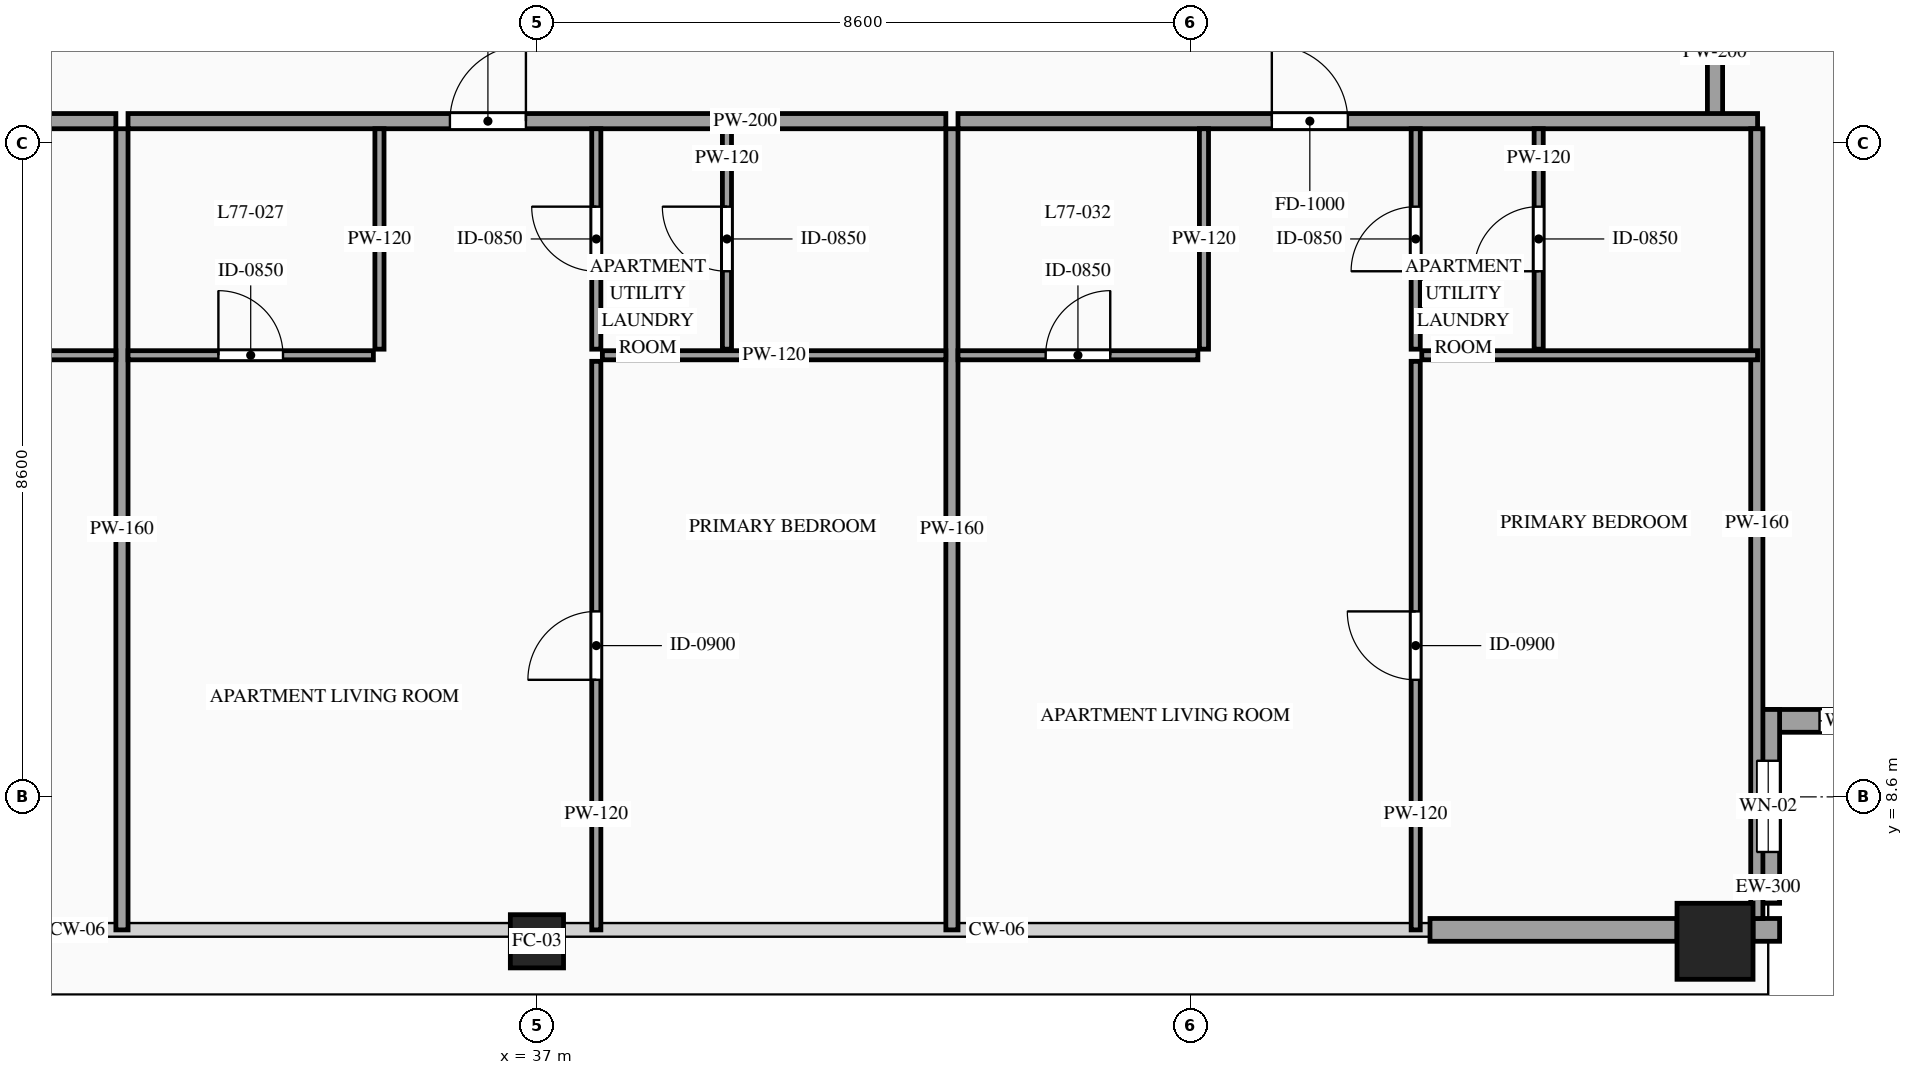
"""IFC4 building model, lengths in metres.
Left out: names, types, materials, properties, quantities, classifications, styles, units other than length and angle.
Written with IfcOpenShell. Run it as: python <this file> out.ifc"""

import sys

from ifc_helpers import new_model, si_unit, direction, frame, frame_2d, origin, origin_2d, place, context, subcontext, project, spatial, rectangle, hollow_rectangle, extrude, source, transform, mapped, element, fill, save


model = new_model("IFC4")
c1 = context("Model", 3, precision=1e-05, world=origin(), true_north=direction((0.0, 1.0)))
c2 = subcontext(c1, "Body", "Model", "MODEL_VIEW")
j1 = project(units=[si_unit("LENGTHUNIT", "METRE"), si_unit("PLANEANGLEUNIT", "RADIAN")], contexts=[c1])
p1 = place(None, origin())
s1 = spatial("IfcSite", under=j1, at=p1, CompositionType="ELEMENT")
p2 = place(p1, origin())
s2 = spatial("IfcBuilding", under=s1, at=p2, CompositionType="ELEMENT")
p3 = place(p2, frame((0.0, 0.0, 289.1)))
s3 = spatial("IfcBuildingStorey", under=s2, at=p3, CompositionType="ELEMENT", Elevation=289.1)
m1 = source(origin(), c2, "Body", "SweptSolid", [
    extrude(hollow_rectangle(XDim=0.7, YDim=0.7, WallThickness=0.032, at=origin_2d()), origin(), (0.0, 0.0, 1.0), 3.5),
])
p4 = place(p3, frame((37.0, 6.7, 0.0), z_axis=(0.0, 0.0, 1.0), x_axis=(1.0, 0.0, 0.0)))
e1 = element("IfcColumn", 1, at=p4, inside=s3, PredefinedType="COLUMN", context=c2, shape_type="MappedRepresentation", body=[
    mapped(m1, transform((0.0, 0.0, 0.0), scale=1.0)),
])
m2 = source(origin(), c2, "Body", "SweptSolid", [
    extrude(hollow_rectangle(XDim=1.0, YDim=1.0, WallThickness=0.048, at=origin_2d()), origin(), (0.0, 0.0, 1.0), 3.5),
])
p5 = place(p3, frame((52.5, 6.7, 0.0), z_axis=(0.0, 0.0, 1.0), x_axis=(1.0, 0.0, 0.0)))
e2 = element("IfcColumn", 2, at=p5, inside=s3, PredefinedType="COLUMN", context=c2, shape_type="MappedRepresentation", body=[
    mapped(m2, transform((0.0, 0.0, 0.0), scale=1.0)),
])
p6 = place(p3, frame((53.05, 9.6, 0.0), z_axis=(0.0, 0.0, 1.0), x_axis=(1.0, 0.0, 0.0)))
e3 = element("IfcWall", 3, at=p6, inside=s3, PredefinedType="SOLIDWALL", context=c2, shape_type="SweptSolid", body=[
    extrude(rectangle(XDim=2.55, YDim=0.3, at=frame_2d((1.275, 0.0))), origin(), (0.0, 0.0, 1.0), 3.28),
])
p7 = place(p6, frame((0.825, 0.0, 0.85)))
e4 = element("IfcOpeningElement", 4, at=p7, cuts=e3, PredefinedType="OPENING", context=c2, shape_type="SweptSolid", body=[
    extrude(rectangle(XDim=0.9, YDim=1.5, at=frame_2d((0.45, 0.75))), frame((0.0, 0.165, 0.0), z_axis=(0.0, -1.0, 0.0), x_axis=(1.0, 0.0, 0.0)), (0.0, 0.0, 1.0), 0.33),
])
p8 = place(p3, frame((53.2, 7.2, 0.0), z_axis=(0.0, 0.0, 1.0), x_axis=(0.0, 1.0, 0.0)))
e5 = element("IfcWall", 5, at=p8, inside=s3, PredefinedType="SOLIDWALL", context=c2, shape_type="SweptSolid", body=[
    extrude(rectangle(XDim=2.55, YDim=0.3, at=frame_2d((1.275, 0.0))), origin(), (0.0, 0.0, 1.0), 3.28),
])
p9 = place(p8, frame((0.675, 0.0, 0.85)))
e6 = element("IfcOpeningElement", 6, at=p9, cuts=e5, PredefinedType="OPENING", context=c2, shape_type="SweptSolid", body=[
    extrude(rectangle(XDim=1.2, YDim=2.1, at=frame_2d((0.6, 1.05))), frame((0.0, 0.165, 0.0), z_axis=(0.0, -1.0, 0.0), x_axis=(1.0, 0.0, 0.0)), (0.0, 0.0, 1.0), 0.33),
])
m3 = source(origin(), c2, "Body", "SweptSolid", [
    extrude(rectangle(XDim=0.35, YDim=0.3, at=frame_2d((0.175, 0.0))), origin(), (0.0, 0.0, 1.0), 3.28),
])
p10 = place(p3, frame((53.0, 6.85, 0.0), z_axis=(0.0, 0.0, 1.0), x_axis=(1.0, 0.0, 0.0)))
e7 = element("IfcWall", 7, at=p10, inside=s3, PredefinedType="SOLIDWALL", context=c2, shape_type="MappedRepresentation", body=[
    mapped(m3, transform((0.0, 0.0, 0.0), scale=1.0)),
])
m4 = source(origin(), c2, "Body", "SweptSolid", [
    extrude(rectangle(XDim=3.25, YDim=0.3, at=frame_2d((1.625, 0.0))), origin(), (0.0, 0.0, 1.0), 2.885),
])
p11 = place(p3, frame((48.75, 6.85, 0.0), z_axis=(0.0, 0.0, 1.0), x_axis=(1.0, 0.0, 0.0)))
e8 = element("IfcWall", 8, at=p11, inside=s3, PredefinedType="SOLIDWALL", context=c2, shape_type="MappedRepresentation", body=[
    mapped(m4, transform((0.0, 0.0, 0.0), scale=1.0)),
])
m5 = source(origin(), c2, "Body", "SweptSolid", [
    extrude(rectangle(XDim=1.7, YDim=0.2, at=frame_2d((0.85, 0.0))), origin(), (0.0, 0.0, 1.0), 3.28),
])
p12 = place(p3, frame((52.5, 17.55, 0.0), z_axis=(0.0, 0.0, 1.0), x_axis=(0.0, 1.0, 0.0)))
e9 = element("IfcWall", 9, at=p12, inside=s3, PredefinedType="PARTITIONING", context=c2, shape_type="MappedRepresentation", body=[
    mapped(m5, transform((0.0, 0.0, 0.0), scale=1.0)),
])
p13 = place(p3, frame((20.94, 17.49, 0.0), z_axis=(0.0, 0.0, 1.0), x_axis=(1.0, 0.0, 0.0)))
e10 = element("IfcWall", 10, at=p13, inside=s3, PredefinedType="PARTITIONING", context=c2, shape_type="SweptSolid", body=[
    extrude(rectangle(XDim=10.52, YDim=0.2, at=frame_2d((5.26, 0.0))), origin(), (0.0, 0.0, 1.0), 3.28),
])
p14 = place(p13, frame((4.129, 0.0, 0.0)))
e11 = element("IfcOpeningElement", 11, at=p14, cuts=e10, PredefinedType="OPENING", context=c2, shape_type="SweptSolid", body=[
    extrude(rectangle(XDim=1.0, YDim=2.2, at=frame_2d((0.5, 1.1))), frame((0.0, 0.115, 0.0), z_axis=(0.0, -1.0, 0.0), x_axis=(1.0, 0.0, 0.0)), (0.0, 0.0, 1.0), 0.23),
])
m6 = source(origin(), c2, "Body", "SweptSolid", [
    extrude(rectangle(XDim=10.54, YDim=0.16, at=frame_2d((5.27, 0.0))), origin(), (0.0, 0.0, 1.0), 3.28),
])
p15 = place(p3, frame((31.54, 6.85, 0.0), z_axis=(0.0, 0.0, 1.0), x_axis=(0.0, 1.0, 0.0)))
e12 = element("IfcWall", 12, at=p15, inside=s3, PredefinedType="PARTITIONING", context=c2, shape_type="MappedRepresentation", body=[
    mapped(m6, transform((0.0, 0.0, 0.0), scale=1.0)),
])
m7 = source(origin(), c2, "Body", "SweptSolid", [
    extrude(rectangle(XDim=4.418, YDim=0.12, at=frame_2d((2.209, 0.0))), origin(), (0.0, 0.0, 1.0), 3.28),
])
p16 = place(p3, frame((27.042, 14.41, 0.0), z_axis=(0.0, 0.0, 1.0), x_axis=(1.0, 0.0, 0.0)))
e13 = element("IfcWall", 13, at=p16, inside=s3, PredefinedType="PARTITIONING", context=c2, shape_type="MappedRepresentation", body=[
    mapped(m7, transform((0.0, 0.0, 0.0), scale=1.0)),
])
p17 = place(p3, frame((31.62, 17.49, 0.0), z_axis=(0.0, 0.0, 1.0), x_axis=(1.0, 0.0, 0.0)))
e14 = element("IfcWall", 14, at=p17, inside=s3, PredefinedType="PARTITIONING", context=c2, shape_type="SweptSolid", body=[
    extrude(rectangle(XDim=10.76, YDim=0.2, at=frame_2d((5.38, 0.0))), origin(), (0.0, 0.0, 1.0), 3.28),
])
p18 = place(p17, frame((4.235, 0.0, 0.0)))
e15 = element("IfcOpeningElement", 15, at=p18, cuts=e14, PredefinedType="OPENING", context=c2, shape_type="SweptSolid", body=[
    extrude(rectangle(XDim=1.0, YDim=2.2, at=frame_2d((0.5, 1.1))), frame((0.0, 0.115, 0.0), z_axis=(0.0, -1.0, 0.0), x_axis=(1.0, 0.0, 0.0)), (0.0, 0.0, 1.0), 0.23),
])
p19 = place(p3, frame((42.46, 6.85, 0.0), z_axis=(0.0, 0.0, 1.0), x_axis=(0.0, 1.0, 0.0)))
e16 = element("IfcWall", 16, at=p19, inside=s3, PredefinedType="PARTITIONING", context=c2, shape_type="MappedRepresentation", body=[
    mapped(m6, transform((0.0, 0.0, 0.0), scale=1.0)),
])
p20 = place(p3, frame((31.62, 14.41, 0.0), z_axis=(0.0, 0.0, 1.0), x_axis=(1.0, 0.0, 0.0)))
e17 = element("IfcWall", 17, at=p20, inside=s3, PredefinedType="PARTITIONING", context=c2, shape_type="SweptSolid", body=[
    extrude(rectangle(XDim=3.228, YDim=0.12, at=frame_2d((1.614, 0.0))), origin(), (0.0, 0.0, 1.0), 3.28),
])
p21 = place(p20, frame((1.189, 0.0, 0.0)))
e18 = element("IfcOpeningElement", 18, at=p21, cuts=e17, PredefinedType="OPENING", context=c2, shape_type="SweptSolid", body=[
    extrude(rectangle(XDim=0.85, YDim=2.1, at=frame_2d((0.425, 1.05))), frame((0.0, 0.075, 0.0), z_axis=(0.0, -1.0, 0.0), x_axis=(1.0, 0.0, 0.0)), (0.0, 0.0, 1.0), 0.15),
])
m8 = source(origin(), c2, "Body", "SweptSolid", [
    extrude(rectangle(XDim=2.9, YDim=0.12, at=frame_2d((1.45, 0.0))), origin(), (0.0, 0.0, 1.0), 3.28),
])
p22 = place(p3, frame((34.928, 14.49, 0.0), z_axis=(0.0, 0.0, 1.0), x_axis=(0.0, 1.0, 0.0)))
e19 = element("IfcWall", 19, at=p22, inside=s3, PredefinedType="PARTITIONING", context=c2, shape_type="MappedRepresentation", body=[
    mapped(m8, transform((0.0, 0.0, 0.0), scale=1.0)),
])
p23 = place(p3, frame((39.5, 14.49, 0.0), z_axis=(0.0, 0.0, 1.0), x_axis=(0.0, 1.0, 0.0)))
e20 = element("IfcWall", 20, at=p23, inside=s3, PredefinedType="PARTITIONING", context=c2, shape_type="SweptSolid", body=[
    extrude(rectangle(XDim=2.9, YDim=0.12, at=frame_2d((1.45, 0.0))), origin(), (0.0, 0.0, 1.0), 3.28),
])
p24 = place(p23, frame((1.025, 0.0, 0.0)))
e21 = element("IfcOpeningElement", 21, at=p24, cuts=e20, PredefinedType="OPENING", context=c2, shape_type="SweptSolid", body=[
    extrude(rectangle(XDim=0.85, YDim=2.1, at=frame_2d((0.425, 1.05))), frame((0.0, 0.075, 0.0), z_axis=(0.0, -1.0, 0.0), x_axis=(1.0, 0.0, 0.0)), (0.0, 0.0, 1.0), 0.15),
])
m9 = source(origin(), c2, "Body", "SweptSolid", [
    extrude(rectangle(XDim=4.519, YDim=0.12, at=frame_2d((2.259, 0.0))), origin(), (0.0, 0.0, 1.0), 3.28),
])
p25 = place(p3, frame((37.861, 14.41, 0.0), z_axis=(0.0, 0.0, 1.0), x_axis=(1.0, 0.0, 0.0)))
e22 = element("IfcWall", 22, at=p25, inside=s3, PredefinedType="PARTITIONING", context=c2, shape_type="MappedRepresentation", body=[
    mapped(m9, transform((0.0, 0.0, 0.0), scale=1.0)),
])
p26 = place(p3, frame((37.781, 6.85, 0.0), z_axis=(0.0, 0.0, 1.0), x_axis=(0.0, 1.0, 0.0)))
e23 = element("IfcWall", 23, at=p26, inside=s3, PredefinedType="PARTITIONING", context=c2, shape_type="SweptSolid", body=[
    extrude(rectangle(XDim=7.48, YDim=0.12, at=frame_2d((3.74, 0.0))), origin(), (0.0, 0.0, 1.0), 3.28),
])
p27 = place(p26, frame((3.29, 0.0, 0.0)))
e24 = element("IfcOpeningElement", 24, at=p27, cuts=e23, PredefinedType="OPENING", context=c2, shape_type="SweptSolid", body=[
    extrude(rectangle(XDim=0.9, YDim=2.15, at=frame_2d((0.45, 1.075))), frame((0.0, 0.075, 0.0), z_axis=(0.0, -1.0, 0.0), x_axis=(1.0, 0.0, 0.0)), (0.0, 0.0, 1.0), 0.15),
])
p28 = place(p3, frame((37.781, 14.49, 0.0), z_axis=(0.0, 0.0, 1.0), x_axis=(0.0, 1.0, 0.0)))
e25 = element("IfcWall", 25, at=p28, inside=s3, PredefinedType="PARTITIONING", context=c2, shape_type="SweptSolid", body=[
    extrude(rectangle(XDim=2.9, YDim=0.12, at=frame_2d((1.45, 0.0))), origin(), (0.0, 0.0, 1.0), 3.28),
])
p29 = place(p28, frame((1.025, 0.0, 0.0)))
e26 = element("IfcOpeningElement", 26, at=p29, cuts=e25, PredefinedType="OPENING", context=c2, shape_type="SweptSolid", body=[
    extrude(rectangle(XDim=0.85, YDim=2.1, at=frame_2d((0.425, 1.05))), frame((0.0, 0.075, 0.0), z_axis=(0.0, -1.0, 0.0), x_axis=(1.0, 0.0, 0.0)), (0.0, 0.0, 1.0), 0.15),
])
p30 = place(p3, frame((42.54, 17.49, 0.0), z_axis=(0.0, 0.0, 1.0), x_axis=(1.0, 0.0, 0.0)))
e27 = element("IfcWall", 27, at=p30, inside=s3, PredefinedType="PARTITIONING", context=c2, shape_type="SweptSolid", body=[
    extrude(rectangle(XDim=10.52, YDim=0.2, at=frame_2d((5.26, 0.0))), origin(), (0.0, 0.0, 1.0), 3.28),
])
p31 = place(p30, frame((4.129, 0.0, 0.0)))
e28 = element("IfcOpeningElement", 28, at=p31, cuts=e27, PredefinedType="OPENING", context=c2, shape_type="SweptSolid", body=[
    extrude(rectangle(XDim=1.0, YDim=2.2, at=frame_2d((0.5, 1.1))), frame((0.0, 0.115, 0.0), z_axis=(0.0, -1.0, 0.0), x_axis=(1.0, 0.0, 0.0)), (0.0, 0.0, 1.0), 0.23),
])
m10 = source(origin(), c2, "Body", "SweptSolid", [
    extrude(rectangle(XDim=10.39, YDim=0.16, at=frame_2d((5.195, 0.0))), origin(), (0.0, 0.0, 1.0), 3.28),
])
p32 = place(p3, frame((53.05, 7.0, 0.0), z_axis=(0.0, 0.0, 1.0), x_axis=(0.0, 1.0, 0.0)))
e29 = element("IfcWall", 29, at=p32, inside=s3, PredefinedType="PARTITIONING", context=c2, shape_type="MappedRepresentation", body=[
    mapped(m10, transform((0.0, 0.0, 0.0), scale=1.0)),
])
p33 = place(p3, frame((42.54, 14.41, 0.0), z_axis=(0.0, 0.0, 1.0), x_axis=(1.0, 0.0, 0.0)))
e30 = element("IfcWall", 30, at=p33, inside=s3, PredefinedType="PARTITIONING", context=c2, shape_type="SweptSolid", body=[
    extrude(rectangle(XDim=3.156, YDim=0.12, at=frame_2d((1.578, 0.0))), origin(), (0.0, 0.0, 1.0), 3.28),
])
p34 = place(p33, frame((1.153, 0.0, 0.0)))
e31 = element("IfcOpeningElement", 31, at=p34, cuts=e30, PredefinedType="OPENING", context=c2, shape_type="SweptSolid", body=[
    extrude(rectangle(XDim=0.85, YDim=2.1, at=frame_2d((0.425, 1.05))), frame((0.0, 0.075, 0.0), z_axis=(0.0, -1.0, 0.0), x_axis=(1.0, 0.0, 0.0)), (0.0, 0.0, 1.0), 0.15),
])
p35 = place(p3, frame((45.776, 14.49, 0.0), z_axis=(0.0, 0.0, 1.0), x_axis=(0.0, 1.0, 0.0)))
e32 = element("IfcWall", 32, at=p35, inside=s3, PredefinedType="PARTITIONING", context=c2, shape_type="MappedRepresentation", body=[
    mapped(m8, transform((0.0, 0.0, 0.0), scale=1.0)),
])
p36 = place(p3, frame((50.18, 14.49, 0.0), z_axis=(0.0, 0.0, 1.0), x_axis=(0.0, 1.0, 0.0)))
e33 = element("IfcWall", 33, at=p36, inside=s3, PredefinedType="PARTITIONING", context=c2, shape_type="SweptSolid", body=[
    extrude(rectangle(XDim=2.9, YDim=0.12, at=frame_2d((1.45, 0.0))), origin(), (0.0, 0.0, 1.0), 2.825),
])
p37 = place(p36, frame((1.025, 0.0, 0.0)))
e34 = element("IfcOpeningElement", 34, at=p37, cuts=e33, PredefinedType="OPENING", context=c2, shape_type="SweptSolid", body=[
    extrude(rectangle(XDim=0.85, YDim=2.1, at=frame_2d((0.425, 1.05))), frame((0.0, 0.075, 0.0), z_axis=(0.0, -1.0, 0.0), x_axis=(1.0, 0.0, 0.0)), (0.0, 0.0, 1.0), 0.15),
])
p38 = place(p3, frame((48.642, 14.41, 0.0), z_axis=(0.0, 0.0, 1.0), x_axis=(1.0, 0.0, 0.0)))
e35 = element("IfcWall", 35, at=p38, inside=s3, PredefinedType="PARTITIONING", context=c2, shape_type="MappedRepresentation", body=[
    mapped(m7, transform((0.0, 0.0, 0.0), scale=1.0)),
])
p39 = place(p3, frame((48.562, 6.85, 0.0), z_axis=(0.0, 0.0, 1.0), x_axis=(0.0, 1.0, 0.0)))
e36 = element("IfcWall", 36, at=p39, inside=s3, PredefinedType="PARTITIONING", context=c2, shape_type="SweptSolid", body=[
    extrude(rectangle(XDim=7.48, YDim=0.12, at=frame_2d((3.74, 0.0))), origin(), (0.0, 0.0, 1.0), 3.28),
])
p40 = place(p39, frame((3.29, 0.0, 0.0)))
e37 = element("IfcOpeningElement", 37, at=p40, cuts=e36, PredefinedType="OPENING", context=c2, shape_type="SweptSolid", body=[
    extrude(rectangle(XDim=0.9, YDim=2.15, at=frame_2d((0.45, 1.075))), frame((0.0, 0.075, 0.0), z_axis=(0.0, -1.0, 0.0), x_axis=(1.0, 0.0, 0.0)), (0.0, 0.0, 1.0), 0.15),
])
p41 = place(p3, frame((48.562, 14.49, 0.0), z_axis=(0.0, 0.0, 1.0), x_axis=(0.0, 1.0, 0.0)))
e38 = element("IfcWall", 38, at=p41, inside=s3, PredefinedType="PARTITIONING", context=c2, shape_type="SweptSolid", body=[
    extrude(rectangle(XDim=2.9, YDim=0.12, at=frame_2d((1.45, 0.0))), origin(), (0.0, 0.0, 1.0), 3.28),
])
p42 = place(p41, frame((1.025, 0.0, 0.0)))
e39 = element("IfcOpeningElement", 39, at=p42, cuts=e38, PredefinedType="OPENING", context=c2, shape_type="SweptSolid", body=[
    extrude(rectangle(XDim=0.85, YDim=2.1, at=frame_2d((0.425, 1.05))), frame((0.0, 0.075, 0.0), z_axis=(0.0, -1.0, 0.0), x_axis=(1.0, 0.0, 0.0)), (0.0, 0.0, 1.0), 0.15),
])
m11 = source(origin(), c2, "Body", "SweptSolid", [
    extrude(rectangle(XDim=0.9, YDim=1.5, at=frame_2d((0.45, 0.75))), frame((0.0, 0.03, 0.0), z_axis=(0.0, -1.0, 0.0), x_axis=(1.0, 0.0, 0.0)), (0.0, 0.0, 1.0), 0.06),
])
p43 = place(p7, origin())
e40 = element("IfcWindow", 40, at=p43, inside=s3, PartitioningType="SINGLE_PANEL", PredefinedType="WINDOW", context=c2, shape_type="MappedRepresentation", body=[
    mapped(m11, transform((0.0, 0.0, 0.0), scale=1.0)),
])
fill(e4, e40)
m12 = source(origin(), c2, "Body", "SweptSolid", [
    extrude(rectangle(XDim=1.2, YDim=2.1, at=frame_2d((0.6, 1.05))), frame((0.0, 0.03, 0.0), z_axis=(0.0, -1.0, 0.0), x_axis=(1.0, 0.0, 0.0)), (0.0, 0.0, 1.0), 0.06),
])
p44 = place(p9, origin())
e41 = element("IfcWindow", 41, at=p44, inside=s3, PartitioningType="SINGLE_PANEL", PredefinedType="WINDOW", context=c2, shape_type="MappedRepresentation", body=[
    mapped(m12, transform((0.0, 0.0, 0.0), scale=1.0)),
])
fill(e6, e41)
m13 = source(origin(), c2, "Body", "SweptSolid", [
    extrude(rectangle(XDim=1.0, YDim=2.2, at=frame_2d((0.5, 1.1))), frame((0.0, 0.025, 0.0), z_axis=(0.0, -1.0, 0.0), x_axis=(1.0, 0.0, 0.0)), (0.0, 0.0, 1.0), 0.05),
])
p45 = place(p18, origin())
e42 = element("IfcDoor", 42, at=p45, inside=s3, OperationType="SINGLE_SWING_RIGHT", PredefinedType="DOOR", context=c2, shape_type="MappedRepresentation", body=[
    mapped(m13, transform((0.0, 0.0, 0.0), scale=1.0)),
])
fill(e15, e42)
m14 = source(origin(), c2, "Body", "SweptSolid", [
    extrude(rectangle(XDim=0.85, YDim=2.1, at=frame_2d((0.425, 1.05))), frame((0.0, 0.025, 0.0), z_axis=(0.0, -1.0, 0.0), x_axis=(1.0, 0.0, 0.0)), (0.0, 0.0, 1.0), 0.05),
])
p46 = place(p21, origin())
e43 = element("IfcDoor", 43, at=p46, inside=s3, OperationType="SINGLE_SWING_LEFT", PredefinedType="DOOR", context=c2, shape_type="MappedRepresentation", body=[
    mapped(m14, transform((0.0, 0.0, 0.0), scale=1.0)),
])
fill(e18, e43)
p47 = place(p24, origin())
e44 = element("IfcDoor", 44, at=p47, inside=s3, OperationType="SINGLE_SWING_RIGHT", PredefinedType="DOOR", context=c2, shape_type="MappedRepresentation", body=[
    mapped(m14, transform((0.0, 0.0, 0.0), scale=1.0)),
])
fill(e21, e44)
m15 = source(origin(), c2, "Body", "SweptSolid", [
    extrude(rectangle(XDim=0.9, YDim=2.15, at=frame_2d((0.45, 1.075))), frame((0.0, 0.025, 0.0), z_axis=(0.0, -1.0, 0.0), x_axis=(1.0, 0.0, 0.0)), (0.0, 0.0, 1.0), 0.05),
])
p48 = place(p27, origin())
e45 = element("IfcDoor", 45, at=p48, inside=s3, OperationType="SINGLE_SWING_LEFT", PredefinedType="DOOR", context=c2, shape_type="MappedRepresentation", body=[
    mapped(m15, transform((0.0, 0.0, 0.0), scale=1.0)),
])
fill(e24, e45)
p49 = place(p29, origin())
e46 = element("IfcDoor", 46, at=p49, inside=s3, OperationType="SINGLE_SWING_RIGHT", PredefinedType="DOOR", context=c2, shape_type="MappedRepresentation", body=[
    mapped(m14, transform((0.0, 0.0, 0.0), scale=1.0)),
])
fill(e26, e46)
p50 = place(p31, origin())
e47 = element("IfcDoor", 47, at=p50, inside=s3, OperationType="SINGLE_SWING_LEFT", PredefinedType="DOOR", context=c2, shape_type="MappedRepresentation", body=[
    mapped(m13, transform((0.0, 0.0, 0.0), scale=1.0)),
])
fill(e28, e47)
p51 = place(p34, origin())
e48 = element("IfcDoor", 48, at=p51, inside=s3, OperationType="SINGLE_SWING_RIGHT", PredefinedType="DOOR", context=c2, shape_type="MappedRepresentation", body=[
    mapped(m14, transform((0.0, 0.0, 0.0), scale=1.0)),
])
fill(e31, e48)
p52 = place(p37, origin())
e49 = element("IfcDoor", 49, at=p52, inside=s3, OperationType="SINGLE_SWING_LEFT", PredefinedType="DOOR", context=c2, shape_type="MappedRepresentation", body=[
    mapped(m14, transform((0.0, 0.0, 0.0), scale=1.0)),
])
fill(e34, e49)
p53 = place(p40, origin())
e50 = element("IfcDoor", 50, at=p53, inside=s3, OperationType="SINGLE_SWING_RIGHT", PredefinedType="DOOR", context=c2, shape_type="MappedRepresentation", body=[
    mapped(m15, transform((0.0, 0.0, 0.0), scale=1.0)),
])
fill(e37, e50)
p54 = place(p42, origin())
e51 = element("IfcDoor", 51, at=p54, inside=s3, OperationType="SINGLE_SWING_LEFT", PredefinedType="DOOR", context=c2, shape_type="MappedRepresentation", body=[
    mapped(m14, transform((0.0, 0.0, 0.0), scale=1.0)),
])
fill(e39, e51)
save(model, sys.argv[1])
